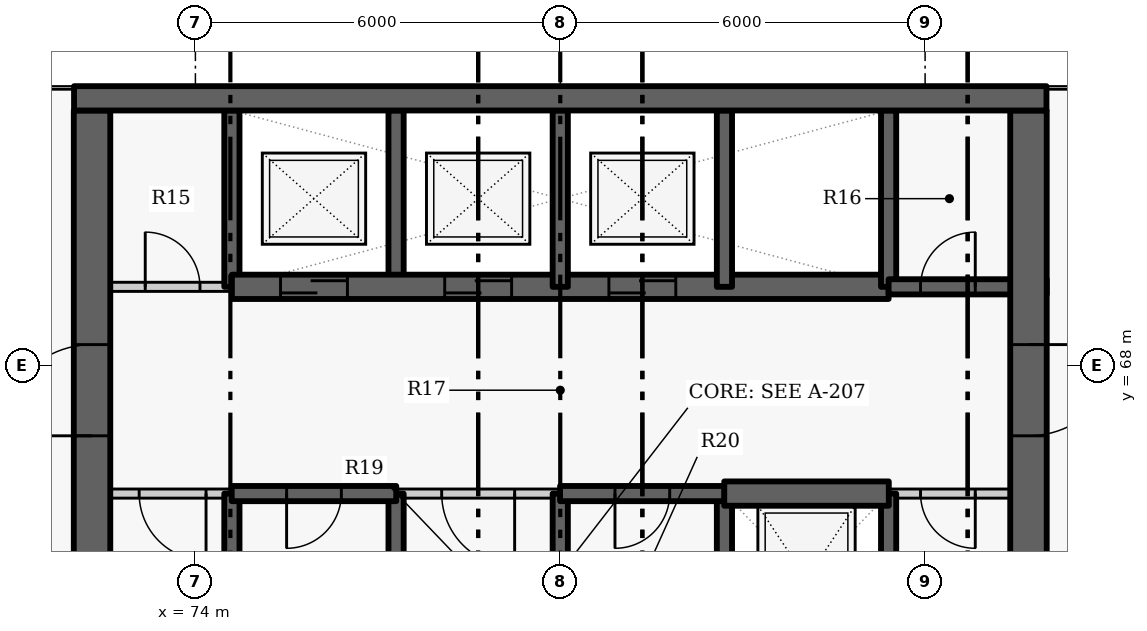
"""IFC4 building model, lengths in metres.
Left out: names, types, materials, properties, quantities, classifications, styles, units other than length and angle.
Written with IfcOpenShell. Run it as: python <this file> out.ifc"""

import sys

from ifc_helpers import new_model, si_unit, direction, frame, frame_2d, origin, place, context, subcontext, project, spatial, rectangle, extrude, element, fill, save


model = new_model("IFC4")
c1 = context("Model", 3, precision=1e-05, world=origin(), true_north=direction((0.0, 1.0)))
c2 = subcontext(c1, "Body", "Model", "MODEL_VIEW")
j1 = project(units=[si_unit("LENGTHUNIT", "METRE"), si_unit("PLANEANGLEUNIT", "RADIAN")], contexts=[c1])
p1 = place(None, origin())
s1 = spatial("IfcSite", under=j1, at=p1, CompositionType="ELEMENT")
p2 = place(p1, origin())
s2 = spatial("IfcBuilding", under=s1, at=p2, CompositionType="ELEMENT")
p3 = place(p2, frame((0.0, 0.0, 28.2)))
s3 = spatial("IfcBuildingStorey", under=s2, at=p3, CompositionType="ELEMENT", Elevation=28.2)
p4 = place(p3, frame((74.6, 63.1, -0.275), z_axis=(0.0, 0.0, 1.0), x_axis=(0.0, 1.0, 0.0)))
e1 = element("IfcWall", 1, at=p4, inside=s3, PredefinedType="SHEAR", context=c2, shape_type="SweptSolid", body=[
    extrude(rectangle(XDim=2.8, YDim=0.25, at=frame_2d((1.4, 0.0))), origin(), (0.0, 0.0, 1.0), 3.3),
])
p5 = place(p3, frame((74.6, 69.3, -0.275), z_axis=(0.0, 0.0, 1.0), x_axis=(0.0, 1.0, 0.0)))
e2 = element("IfcWall", 2, at=p5, inside=s3, PredefinedType="SHEAR", context=c2, shape_type="SweptSolid", body=[
    extrude(rectangle(XDim=2.9, YDim=0.25, at=frame_2d((1.45, 0.0))), origin(), (0.0, 0.0, 1.0), 3.3),
])
p6 = place(p3, frame((72.0, 69.3, 0.0), z_axis=(0.0, 0.0, 1.0), x_axis=(1.0, 0.0, 0.0)))
e3 = element("IfcWall", 3, at=p6, inside=s3, PredefinedType="PARTITIONING", context=c2, shape_type="SweptSolid", body=[
    extrude(rectangle(XDim=2.6, YDim=0.15, at=frame_2d((1.3, 0.0))), origin(), (0.0, 0.0, 1.0), 3.025),
])
p7 = place(p6, frame((1.175, 0.0, 0.0)))
e4 = element("IfcOpeningElement", 4, at=p7, cuts=e3, PredefinedType="OPENING", context=c2, shape_type="SweptSolid", body=[
    extrude(rectangle(XDim=0.9, YDim=2.1, at=frame_2d((0.45, 1.05))), frame((0.0, 0.085, 0.0), z_axis=(0.0, -1.0, 0.0), x_axis=(1.0, 0.0, 0.0)), (0.0, 0.0, 1.0), 0.17),
])
p8 = place(p3, frame((72.3, 63.1, -0.275), z_axis=(0.0, 0.0, 1.0), x_axis=(0.0, 1.0, 0.0)))
e5 = element("IfcWall", 5, at=p8, inside=s3, PredefinedType="SHEAR", context=c2, shape_type="SweptSolid", body=[
    extrude(rectangle(XDim=9.1, YDim=0.6, at=frame_2d((4.55, 0.0))), origin(), (0.0, 0.0, 1.0), 3.3),
])
p9 = place(p8, frame((3.75, 0.0, 0.275)))
e6 = element("IfcOpeningElement", 6, at=p9, cuts=e5, PredefinedType="OPENING", context=c2, shape_type="SweptSolid", body=[
    extrude(rectangle(XDim=1.5, YDim=2.1, at=frame_2d((0.75, 1.05))), frame((0.0, 0.31, 0.0), z_axis=(0.0, -1.0, 0.0), x_axis=(1.0, 0.0, 0.0)), (0.0, 0.0, 1.0), 0.62),
])
p10 = place(p3, frame((77.3, 63.1, -0.275), z_axis=(0.0, 0.0, 1.0), x_axis=(0.0, 1.0, 0.0)))
e7 = element("IfcWall", 7, at=p10, inside=s3, PredefinedType="SHEAR", context=c2, shape_type="SweptSolid", body=[
    extrude(rectangle(XDim=2.8, YDim=0.25, at=frame_2d((1.4, 0.0))), origin(), (0.0, 0.0, 1.0), 3.3),
])
p11 = place(p3, frame((77.3, 69.3, -0.275), z_axis=(0.0, 0.0, 1.0), x_axis=(0.0, 1.0, 0.0)))
e8 = element("IfcWall", 8, at=p11, inside=s3, PredefinedType="SHEAR", context=c2, shape_type="SweptSolid", body=[
    extrude(rectangle(XDim=2.9, YDim=0.25, at=frame_2d((1.45, 0.0))), origin(), (0.0, 0.0, 1.0), 3.3),
])
p12 = place(p3, frame((74.6, 69.3, -0.275), z_axis=(0.0, 0.0, 1.0), x_axis=(1.0, 0.0, 0.0)))
e9 = element("IfcWall", 9, at=p12, inside=s3, PredefinedType="SHEAR", context=c2, shape_type="SweptSolid", body=[
    extrude(rectangle(XDim=10.8, YDim=0.4, at=frame_2d((5.4, 0.0))), origin(), (0.0, 0.0, 1.0), 3.3),
])
p13 = place(p12, frame((0.8, 0.0, 0.275)))
e10 = element("IfcOpeningElement", 10, at=p13, cuts=e9, PredefinedType="OPENING", context=c2, shape_type="SweptSolid", body=[
    extrude(rectangle(XDim=1.1, YDim=2.1, at=frame_2d((0.55, 1.05))), frame((0.0, 0.21, 0.0), z_axis=(0.0, -1.0, 0.0), x_axis=(1.0, 0.0, 0.0)), (0.0, 0.0, 1.0), 0.42),
])
p14 = place(p12, frame((3.5, 0.0, 0.275)))
e11 = element("IfcOpeningElement", 11, at=p14, cuts=e9, PredefinedType="OPENING", context=c2, shape_type="SweptSolid", body=[
    extrude(rectangle(XDim=1.1, YDim=2.1, at=frame_2d((0.55, 1.05))), frame((0.0, 0.21, 0.0), z_axis=(0.0, -1.0, 0.0), x_axis=(1.0, 0.0, 0.0)), (0.0, 0.0, 1.0), 0.42),
])
p15 = place(p12, frame((6.2, 0.0, 0.275)))
e12 = element("IfcOpeningElement", 12, at=p15, cuts=e9, PredefinedType="OPENING", context=c2, shape_type="SweptSolid", body=[
    extrude(rectangle(XDim=1.1, YDim=2.1, at=frame_2d((0.55, 1.05))), frame((0.0, 0.21, 0.0), z_axis=(0.0, -1.0, 0.0), x_axis=(1.0, 0.0, 0.0)), (0.0, 0.0, 1.0), 0.42),
])
p16 = place(p3, frame((80.0, 63.1, -0.275), z_axis=(0.0, 0.0, 1.0), x_axis=(0.0, 1.0, 0.0)))
e13 = element("IfcWall", 13, at=p16, inside=s3, PredefinedType="SHEAR", context=c2, shape_type="SweptSolid", body=[
    extrude(rectangle(XDim=2.8, YDim=0.25, at=frame_2d((1.4, 0.0))), origin(), (0.0, 0.0, 1.0), 3.3),
])
p17 = place(p3, frame((80.0, 69.3, -0.275), z_axis=(0.0, 0.0, 1.0), x_axis=(0.0, 1.0, 0.0)))
e14 = element("IfcWall", 14, at=p17, inside=s3, PredefinedType="SHEAR", context=c2, shape_type="SweptSolid", body=[
    extrude(rectangle(XDim=2.9, YDim=0.25, at=frame_2d((1.45, 0.0))), origin(), (0.0, 0.0, 1.0), 3.3),
])
p18 = place(p3, frame((82.7, 63.1, -0.275), z_axis=(0.0, 0.0, 1.0), x_axis=(0.0, 1.0, 0.0)))
e15 = element("IfcWall", 15, at=p18, inside=s3, PredefinedType="SHEAR", context=c2, shape_type="SweptSolid", body=[
    extrude(rectangle(XDim=2.8, YDim=0.25, at=frame_2d((1.4, 0.0))), origin(), (0.0, 0.0, 1.0), 3.3),
])
p19 = place(p3, frame((82.7, 69.3, -0.275), z_axis=(0.0, 0.0, 1.0), x_axis=(0.0, 1.0, 0.0)))
e16 = element("IfcWall", 16, at=p19, inside=s3, PredefinedType="SHEAR", context=c2, shape_type="SweptSolid", body=[
    extrude(rectangle(XDim=2.9, YDim=0.25, at=frame_2d((1.45, 0.0))), origin(), (0.0, 0.0, 1.0), 3.3),
])
p20 = place(p3, frame((85.4, 63.1, -0.275), z_axis=(0.0, 0.0, 1.0), x_axis=(0.0, 1.0, 0.0)))
e17 = element("IfcWall", 17, at=p20, inside=s3, PredefinedType="SHEAR", context=c2, shape_type="SweptSolid", body=[
    extrude(rectangle(XDim=2.8, YDim=0.25, at=frame_2d((1.4, 0.0))), origin(), (0.0, 0.0, 1.0), 3.3),
])
p21 = place(p3, frame((85.4, 69.3, -0.275), z_axis=(0.0, 0.0, 1.0), x_axis=(0.0, 1.0, 0.0)))
e18 = element("IfcWall", 18, at=p21, inside=s3, PredefinedType="SHEAR", context=c2, shape_type="SweptSolid", body=[
    extrude(rectangle(XDim=2.9, YDim=0.25, at=frame_2d((1.45, 0.0))), origin(), (0.0, 0.0, 1.0), 3.3),
])
p22 = place(p3, frame((85.4, 69.3, -0.275), z_axis=(0.0, 0.0, 1.0), x_axis=(1.0, 0.0, 0.0)))
e19 = element("IfcWall", 19, at=p22, inside=s3, PredefinedType="SHEAR", context=c2, shape_type="SweptSolid", body=[
    extrude(rectangle(XDim=2.6, YDim=0.25, at=frame_2d((1.3, 0.0))), origin(), (0.0, 0.0, 1.0), 3.3),
])
p23 = place(p22, frame((0.525, 0.0, 0.275)))
e20 = element("IfcOpeningElement", 20, at=p23, cuts=e19, PredefinedType="OPENING", context=c2, shape_type="SweptSolid", body=[
    extrude(rectangle(XDim=0.9, YDim=2.1, at=frame_2d((0.45, 1.05))), frame((0.0, 0.135, 0.0), z_axis=(0.0, -1.0, 0.0), x_axis=(1.0, 0.0, 0.0)), (0.0, 0.0, 1.0), 0.27),
])
p24 = place(p3, frame((87.7, 72.2, -0.275), z_axis=(0.0, 0.0, 1.0), x_axis=(0.0, -1.0, 0.0)))
e21 = element("IfcWall", 21, at=p24, inside=s3, PredefinedType="SHEAR", context=c2, shape_type="SweptSolid", body=[
    extrude(rectangle(XDim=15.6, YDim=0.6, at=frame_2d((7.8, 0.0))), origin(), (0.0, 0.0, 1.0), 3.3),
])
p25 = place(p24, frame((3.85, 0.0, 0.275)))
e22 = element("IfcOpeningElement", 22, at=p25, cuts=e21, PredefinedType="OPENING", context=c2, shape_type="SweptSolid", body=[
    extrude(rectangle(XDim=1.5, YDim=2.1, at=frame_2d((0.75, 1.05))), frame((0.0, 0.31, 0.0), z_axis=(0.0, -1.0, 0.0), x_axis=(1.0, 0.0, 0.0)), (0.0, 0.0, 1.0), 0.62),
])
p26 = place(p24, frame((11.8, 0.0, 0.275)))
e23 = element("IfcOpeningElement", 23, at=p26, cuts=e21, PredefinedType="OPENING", context=c2, shape_type="SweptSolid", body=[
    extrude(rectangle(XDim=1.1, YDim=2.1, at=frame_2d((0.55, 1.05))), frame((0.0, 0.31, 0.0), z_axis=(0.0, -1.0, 0.0), x_axis=(1.0, 0.0, 0.0)), (0.0, 0.0, 1.0), 0.62),
])
p27 = place(p3, frame((74.603, 65.9, 0.0), z_axis=(0.0, 0.0, 1.0), x_axis=(-1.0, 0.0, 0.0)))
e24 = element("IfcWall", 24, at=p27, inside=s3, PredefinedType="PARTITIONING", context=c2, shape_type="SweptSolid", body=[
    extrude(rectangle(XDim=2.603, YDim=0.15, at=frame_2d((1.302, 0.0))), origin(), (0.0, 0.0, 1.0), 3.025),
])
p28 = place(p27, frame((0.428, 0.0, 0.0)))
e25 = element("IfcOpeningElement", 25, at=p28, cuts=e24, PredefinedType="OPENING", context=c2, shape_type="SweptSolid", body=[
    extrude(rectangle(XDim=1.1, YDim=2.1, at=frame_2d((0.55, 1.05))), frame((0.0, 0.085, 0.0), z_axis=(0.0, -1.0, 0.0), x_axis=(1.0, 0.0, 0.0)), (0.0, 0.0, 1.0), 0.17),
])
p29 = place(p3, frame((80.003, 65.9, 0.0), z_axis=(0.0, 0.0, 1.0), x_axis=(-1.0, 0.0, 0.0)))
e26 = element("IfcWall", 26, at=p29, inside=s3, PredefinedType="PARTITIONING", context=c2, shape_type="SweptSolid", body=[
    extrude(rectangle(XDim=2.706, YDim=0.15, at=frame_2d((1.353, 0.0))), origin(), (0.0, 0.0, 1.0), 3.025),
])
p30 = place(p29, frame((0.753, 0.0, 0.0)))
e27 = element("IfcOpeningElement", 27, at=p30, cuts=e26, PredefinedType="OPENING", context=c2, shape_type="SweptSolid", body=[
    extrude(rectangle(XDim=1.2, YDim=2.1, at=frame_2d((0.6, 1.05))), frame((0.0, 0.085, 0.0), z_axis=(0.0, -1.0, 0.0), x_axis=(1.0, 0.0, 0.0)), (0.0, 0.0, 1.0), 0.17),
])
p31 = place(p3, frame((88.0, 65.9, 0.0), z_axis=(0.0, 0.0, 1.0), x_axis=(-1.0, 0.0, 0.0)))
e28 = element("IfcWall", 28, at=p31, inside=s3, PredefinedType="PARTITIONING", context=c2, shape_type="SweptSolid", body=[
    extrude(rectangle(XDim=2.603, YDim=0.15, at=frame_2d((1.302, 0.0))), origin(), (0.0, 0.0, 1.0), 3.025),
])
p32 = place(p31, frame((1.175, 0.0, 0.0)))
e29 = element("IfcOpeningElement", 29, at=p32, cuts=e28, PredefinedType="OPENING", context=c2, shape_type="SweptSolid", body=[
    extrude(rectangle(XDim=0.9, YDim=2.1, at=frame_2d((0.45, 1.05))), frame((0.0, 0.085, 0.0), z_axis=(0.0, -1.0, 0.0), x_axis=(1.0, 0.0, 0.0)), (0.0, 0.0, 1.0), 0.17),
])
p33 = place(p3, frame((77.303, 65.9, -0.275), z_axis=(0.0, 0.0, 1.0), x_axis=(-1.0, 0.0, 0.0)))
e30 = element("IfcWall", 30, at=p33, inside=s3, PredefinedType="SHEAR", context=c2, shape_type="SweptSolid", body=[
    extrude(rectangle(XDim=2.706, YDim=0.25, at=frame_2d((1.353, 0.0))), origin(), (0.0, 0.0, 1.0), 3.3),
])
p34 = place(p33, frame((0.903, 0.0, 0.275)))
e31 = element("IfcOpeningElement", 31, at=p34, cuts=e30, PredefinedType="OPENING", context=c2, shape_type="SweptSolid", body=[
    extrude(rectangle(XDim=0.9, YDim=2.1, at=frame_2d((0.45, 1.05))), frame((0.0, 0.135, 0.0), z_axis=(0.0, -1.0, 0.0), x_axis=(1.0, 0.0, 0.0)), (0.0, 0.0, 1.0), 0.27),
])
p35 = place(p3, frame((82.703, 65.9, -0.275), z_axis=(0.0, 0.0, 1.0), x_axis=(-1.0, 0.0, 0.0)))
e32 = element("IfcWall", 32, at=p35, inside=s3, PredefinedType="SHEAR", context=c2, shape_type="SweptSolid", body=[
    extrude(rectangle(XDim=2.706, YDim=0.25, at=frame_2d((1.353, 0.0))), origin(), (0.0, 0.0, 1.0), 3.3),
])
p36 = place(p35, frame((0.903, 0.0, 0.275)))
e33 = element("IfcOpeningElement", 33, at=p36, cuts=e32, PredefinedType="OPENING", context=c2, shape_type="SweptSolid", body=[
    extrude(rectangle(XDim=0.9, YDim=2.1, at=frame_2d((0.45, 1.05))), frame((0.0, 0.135, 0.0), z_axis=(0.0, -1.0, 0.0), x_axis=(1.0, 0.0, 0.0)), (0.0, 0.0, 1.0), 0.27),
])
p37 = place(p3, frame((82.697, 65.9, -0.275), z_axis=(0.0, 0.0, 1.0), x_axis=(1.0, 0.0, 0.0)))
e34 = element("IfcWall", 34, at=p37, inside=s3, PredefinedType="SHEAR", context=c2, shape_type="SweptSolid", body=[
    extrude(rectangle(XDim=2.706, YDim=0.4, at=frame_2d((1.353, 0.0))), origin(), (0.0, 0.0, 1.0), 3.3),
])
p38 = place(p3, frame((72.004, 72.4, -0.275), z_axis=(0.0, 0.0, 1.0), x_axis=(1.0, 0.0, 0.0)))
e35 = element("IfcWall", 35, at=p38, inside=s3, PredefinedType="SHEAR", context=c2, shape_type="SweptSolid", body=[
    extrude(rectangle(XDim=15.992, YDim=0.4, at=frame_2d((7.996, 0.0))), origin(), (0.0, 0.0, 1.0), 3.3),
])
p39 = place(p7, origin())
e36 = element("IfcDoor", 36, at=p39, inside=s3, OperationType="SINGLE_SWING_LEFT", PredefinedType="DOOR", context=c2, shape_type="SweptSolid", body=[
    extrude(rectangle(XDim=0.9, YDim=2.1, at=frame_2d((0.45, 1.05))), frame((0.0, 0.025, 0.0), z_axis=(0.0, -1.0, 0.0), x_axis=(1.0, 0.0, 0.0)), (0.0, 0.0, 1.0), 0.05),
])
fill(e4, e36)
p40 = place(p13, origin())
e37 = element("IfcDoor", 37, at=p40, inside=s3, OperationType="SLIDING_TO_LEFT", PredefinedType="DOOR", context=c2, shape_type="SweptSolid", body=[
    extrude(rectangle(XDim=1.1, YDim=2.1, at=frame_2d((0.55, 1.05))), frame((0.0, 0.025, 0.0), z_axis=(0.0, -1.0, 0.0), x_axis=(1.0, 0.0, 0.0)), (0.0, 0.0, 1.0), 0.05),
])
fill(e10, e37)
p41 = place(p14, origin())
e38 = element("IfcDoor", 38, at=p41, inside=s3, OperationType="SLIDING_TO_LEFT", PredefinedType="DOOR", context=c2, shape_type="SweptSolid", body=[
    extrude(rectangle(XDim=1.1, YDim=2.1, at=frame_2d((0.55, 1.05))), frame((0.0, 0.025, 0.0), z_axis=(0.0, -1.0, 0.0), x_axis=(1.0, 0.0, 0.0)), (0.0, 0.0, 1.0), 0.05),
])
fill(e11, e38)
p42 = place(p15, origin())
e39 = element("IfcDoor", 39, at=p42, inside=s3, OperationType="SLIDING_TO_LEFT", PredefinedType="DOOR", context=c2, shape_type="SweptSolid", body=[
    extrude(rectangle(XDim=1.1, YDim=2.1, at=frame_2d((0.55, 1.05))), frame((0.0, 0.025, 0.0), z_axis=(0.0, -1.0, 0.0), x_axis=(1.0, 0.0, 0.0)), (0.0, 0.0, 1.0), 0.05),
])
fill(e12, e39)
p43 = place(p23, origin())
e40 = element("IfcDoor", 40, at=p43, inside=s3, OperationType="SINGLE_SWING_RIGHT", PredefinedType="DOOR", context=c2, shape_type="SweptSolid", body=[
    extrude(rectangle(XDim=0.9, YDim=2.1, at=frame_2d((0.45, 1.05))), frame((0.0, 0.025, 0.0), z_axis=(0.0, -1.0, 0.0), x_axis=(1.0, 0.0, 0.0)), (0.0, 0.0, 1.0), 0.05),
])
fill(e20, e40)
p44 = place(p28, origin())
e41 = element("IfcDoor", 41, at=p44, inside=s3, OperationType="SINGLE_SWING_LEFT", PredefinedType="DOOR", context=c2, shape_type="SweptSolid", body=[
    extrude(rectangle(XDim=1.1, YDim=2.1, at=frame_2d((0.55, 1.05))), frame((0.0, 0.025, 0.0), z_axis=(0.0, -1.0, 0.0), x_axis=(1.0, 0.0, 0.0)), (0.0, 0.0, 1.0), 0.05),
])
fill(e25, e41)
p45 = place(p34, origin())
e42 = element("IfcDoor", 42, at=p45, inside=s3, OperationType="SINGLE_SWING_RIGHT", PredefinedType="DOOR", context=c2, shape_type="SweptSolid", body=[
    extrude(rectangle(XDim=0.9, YDim=2.1, at=frame_2d((0.45, 1.05))), frame((0.0, 0.025, 0.0), z_axis=(0.0, -1.0, 0.0), x_axis=(1.0, 0.0, 0.0)), (0.0, 0.0, 1.0), 0.05),
])
fill(e31, e42)
p46 = place(p30, origin())
e43 = element("IfcDoor", 43, at=p46, inside=s3, OperationType="DOUBLE_DOOR_SINGLE_SWING", PredefinedType="DOOR", context=c2, shape_type="SweptSolid", body=[
    extrude(rectangle(XDim=1.2, YDim=2.1, at=frame_2d((0.6, 1.05))), frame((0.0, 0.025, 0.0), z_axis=(0.0, -1.0, 0.0), x_axis=(1.0, 0.0, 0.0)), (0.0, 0.0, 1.0), 0.05),
])
fill(e27, e43)
p47 = place(p36, origin())
e44 = element("IfcDoor", 44, at=p47, inside=s3, OperationType="SINGLE_SWING_RIGHT", PredefinedType="DOOR", context=c2, shape_type="SweptSolid", body=[
    extrude(rectangle(XDim=0.9, YDim=2.1, at=frame_2d((0.45, 1.05))), frame((0.0, 0.025, 0.0), z_axis=(0.0, -1.0, 0.0), x_axis=(1.0, 0.0, 0.0)), (0.0, 0.0, 1.0), 0.05),
])
fill(e33, e44)
p48 = place(p32, origin())
e45 = element("IfcDoor", 45, at=p48, inside=s3, OperationType="SINGLE_SWING_LEFT", PredefinedType="DOOR", context=c2, shape_type="SweptSolid", body=[
    extrude(rectangle(XDim=0.9, YDim=2.1, at=frame_2d((0.45, 1.05))), frame((0.0, 0.025, 0.0), z_axis=(0.0, -1.0, 0.0), x_axis=(1.0, 0.0, 0.0)), (0.0, 0.0, 1.0), 0.05),
])
fill(e29, e45)
p49 = place(p25, origin())
e46 = element("IfcDoor", 46, at=p49, inside=s3, OperationType="DOUBLE_DOOR_SINGLE_SWING", PredefinedType="DOOR", context=c2, shape_type="SweptSolid", body=[
    extrude(rectangle(XDim=1.5, YDim=2.1, at=frame_2d((0.75, 1.05))), frame((0.0, 0.025, 0.0), z_axis=(0.0, -1.0, 0.0), x_axis=(1.0, 0.0, 0.0)), (0.0, 0.0, 1.0), 0.05),
])
fill(e22, e46)
p50 = place(p9, origin())
e47 = element("IfcDoor", 47, at=p50, inside=s3, OperationType="DOUBLE_DOOR_SINGLE_SWING", PredefinedType="DOOR", context=c2, shape_type="SweptSolid", body=[
    extrude(rectangle(XDim=1.5, YDim=2.1, at=frame_2d((0.75, 1.05))), frame((0.0, 0.025, 0.0), z_axis=(0.0, -1.0, 0.0), x_axis=(1.0, 0.0, 0.0)), (0.0, 0.0, 1.0), 0.05),
])
fill(e6, e47)
save(model, sys.argv[1])
